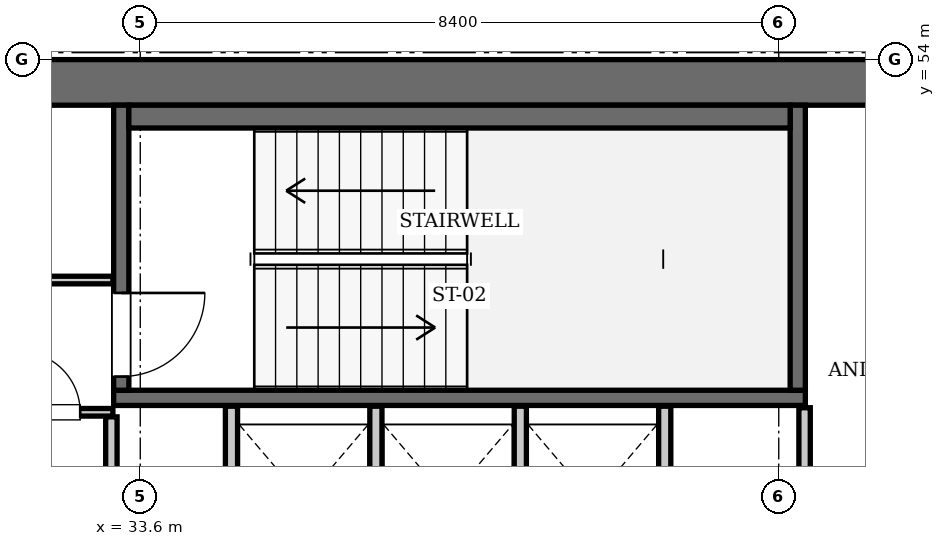
"""IFC4 building model, lengths in metres.
Left out: names, types, materials, properties, quantities, classifications, styles, units other than length and angle.
Written with IfcOpenShell. Run it as: python <this file> out.ifc"""

import sys

from ifc_helpers import new_model, si_unit, direction, frame, frame_2d, origin, place, context, subcontext, project, spatial, rectangle, extrude, element, fill, save


model = new_model("IFC4")
c1 = context("Model", 3, precision=1e-05, world=origin(), true_north=direction((0.0, 1.0)))
c2 = subcontext(c1, "Body", "Model", "MODEL_VIEW")
j1 = project(units=[si_unit("LENGTHUNIT", "METRE"), si_unit("PLANEANGLEUNIT", "RADIAN")], contexts=[c1])
p1 = place(None, origin())
s1 = spatial("IfcSite", under=j1, at=p1, CompositionType="ELEMENT")
p2 = place(p1, origin())
s2 = spatial("IfcBuilding", under=s1, at=p2, CompositionType="ELEMENT")
p3 = place(p2, frame((0.0, 0.0, 258.65)))
s3 = spatial("IfcBuildingStorey", under=s2, at=p3, CompositionType="ELEMENT", Elevation=258.65)
p4 = place(p3, frame((25.2, 53.7, 0.0), z_axis=(0.0, 0.0, 1.0), x_axis=(1.0, 0.0, 0.0)))
e1 = element("IfcWall", 1, at=p4, inside=s3, PredefinedType="SHEAR", context=c2, shape_type="SweptSolid", body=[
    extrude(rectangle(XDim=25.2, YDim=0.6, at=frame_2d((12.6, 0.0))), origin(), (0.0, 0.0, 1.0), 3.85),
])
p5 = place(p3, frame((33.25, 49.55, 0.0), z_axis=(0.0, 0.0, 1.0), x_axis=(1.0, 0.0, 0.0)))
e2 = element("IfcWall", 2, at=p5, inside=s3, PredefinedType="SOLIDWALL", context=c2, shape_type="SweptSolid", body=[
    extrude(rectangle(XDim=9.1, YDim=0.2, at=frame_2d((4.55, 0.0))), origin(), (0.0, 0.0, 1.0), 3.61),
])
p6 = place(p3, frame((42.25, 49.65, 0.0), z_axis=(0.0, 0.0, 1.0), x_axis=(0.0, 1.0, 0.0)))
e3 = element("IfcWall", 3, at=p6, inside=s3, PredefinedType="SOLIDWALL", context=c2, shape_type="SweptSolid", body=[
    extrude(rectangle(XDim=3.75, YDim=0.2, at=frame_2d((1.875, 0.0))), origin(), (0.0, 0.0, 1.0), 3.61),
])
p7 = place(p3, frame((33.35, 49.65, 0.0), z_axis=(0.0, 0.0, 1.0), x_axis=(0.0, 1.0, 0.0)))
e4 = element("IfcWall", 4, at=p7, inside=s3, PredefinedType="SOLIDWALL", context=c2, shape_type="SweptSolid", body=[
    extrude(rectangle(XDim=3.75, YDim=0.2, at=frame_2d((1.875, 0.0))), origin(), (0.0, 0.0, 1.0), 3.61),
])
p8 = place(p7, frame((0.18, 0.0, 0.0)))
e5 = element("IfcOpeningElement", 5, at=p8, cuts=e4, PredefinedType="OPENING", context=c2, shape_type="SweptSolid", body=[
    extrude(rectangle(XDim=1.1, YDim=2.15, at=frame_2d((0.55, 1.075))), frame((0.0, 0.11, 0.0), z_axis=(0.0, -1.0, 0.0), x_axis=(1.0, 0.0, 0.0)), (0.0, 0.0, 1.0), 0.22),
])
p9 = place(p3, frame((33.45, 53.25, 0.0), z_axis=(0.0, 0.0, 1.0), x_axis=(1.0, 0.0, 0.0)))
e6 = element("IfcWall", 6, at=p9, inside=s3, PredefinedType="SOLIDWALL", context=c2, shape_type="SweptSolid", body=[
    extrude(rectangle(XDim=8.7, YDim=0.3, at=frame_2d((4.35, 0.0))), origin(), (0.0, 0.0, 1.0), 3.61),
])
for number, where, z_axis, x_axis in (
    (7, (34.8, 47.25, 0.0), (0.0, 0.0, 1.0), (0.0, 1.0, 0.0)),
    (8, (36.7, 47.25, 0.0), (0.0, 0.0, 1.0), (0.0, 1.0, 0.0)),
    (9, (38.6, 47.25, 0.0), (0.0, 0.0, 1.0), (0.0, 1.0, 0.0)),
    (10, (40.5, 47.25, 0.0), (0.0, 0.0, 1.0), (0.0, 1.0, 0.0)),
):
    element("IfcWall", number, at=place(p3, frame(where, z_axis=z_axis, x_axis=x_axis)), inside=s3, PredefinedType="SOLIDWALL", context=c2, shape_type="SweptSolid", body=[
        extrude(rectangle(XDim=2.19, YDim=0.16, at=frame_2d((1.095, 0.0))), origin(), (0.0, 0.0, 1.0), 3.61),
    ])
p10 = place(p3, frame((33.22, 45.14, 0.0), z_axis=(0.0, 0.0, 1.0), x_axis=(0.0, 1.0, 0.0)))
e11 = element("IfcWall", 11, at=p10, inside=s3, PredefinedType="PARTITIONING", context=c2, shape_type="SweptSolid", body=[
    extrude(rectangle(XDim=4.16, YDim=0.15, at=frame_2d((2.08, 0.0))), origin(), (0.0, 0.0, 1.0), 3.61),
])
p11 = place(p3, frame((30.06, 49.36, 0.0), z_axis=(0.0, 0.0, 1.0), x_axis=(1.0, 0.0, 0.0)))
e12 = element("IfcWall", 12, at=p11, inside=s3, PredefinedType="PARTITIONING", context=c2, shape_type="SweptSolid", body=[
    extrude(rectangle(XDim=3.18, YDim=0.1, at=frame_2d((1.59, 0.0))), origin(), (0.0, 0.0, 1.0), 3.61),
])
p12 = place(p11, frame((1.95, 0.0, 0.0)))
e13 = element("IfcOpeningElement", 13, at=p12, cuts=e12, PredefinedType="OPENING", context=c2, shape_type="SweptSolid", body=[
    extrude(rectangle(XDim=0.8, YDim=2.05, at=frame_2d((0.4, 1.025))), frame((0.0, 0.06, 0.0), z_axis=(0.0, -1.0, 0.0), x_axis=(1.0, 0.0, 0.0)), (0.0, 0.0, 1.0), 0.12),
])
p13 = place(p3, frame((31.82, 51.1, 0.0), z_axis=(0.0, 0.0, 1.0), x_axis=(1.0, 0.0, 0.0)))
e14 = element("IfcWall", 14, at=p13, inside=s3, PredefinedType="PARTITIONING", context=c2, shape_type="SweptSolid", body=[
    extrude(rectangle(XDim=1.42, YDim=0.1, at=frame_2d((0.71, 0.0))), origin(), (0.0, 0.0, 1.0), 3.61),
])
p14 = place(p3, frame((42.34, 47.36, 0.0), z_axis=(0.0, 0.0, 1.0), x_axis=(0.0, 1.0, 0.0)))
e15 = element("IfcWall", 15, at=p14, inside=s3, PredefinedType="PARTITIONING", context=c2, shape_type="SweptSolid", body=[
    extrude(rectangle(XDim=2.06, YDim=0.15, at=frame_2d((1.03, 0.0))), origin(), (0.0, 0.0, 1.0), 3.61),
])
p15 = place(p14, frame((0.24, 0.0, 0.0)))
e16 = element("IfcOpeningElement", 16, at=p15, cuts=e15, PredefinedType="OPENING", context=c2, shape_type="SweptSolid", body=[
    extrude(rectangle(XDim=0.8, YDim=2.05, at=frame_2d((0.4, 1.025))), frame((0.0, 0.085, 0.0), z_axis=(0.0, -1.0, 0.0), x_axis=(1.0, 0.0, 0.0)), (0.0, 0.0, 1.0), 0.17),
])
p16 = place(p8, frame((1.1, 0.0, 0.0), z_axis=(0.0, 0.0, 1.0), x_axis=(-1.0, 0.0, 0.0)))
e17 = element("IfcDoor", 17, at=p16, inside=s3, OperationType="SINGLE_SWING_LEFT", PredefinedType="DOOR", context=c2, shape_type="SweptSolid", body=[
    extrude(rectangle(XDim=1.1, YDim=2.15, at=frame_2d((0.55, 1.075))), frame((0.0, 0.025, 0.0), z_axis=(0.0, -1.0, 0.0), x_axis=(1.0, 0.0, 0.0)), (0.0, 0.0, 1.0), 0.05),
])
fill(e5, e17)
p17 = place(p12, origin())
e18 = element("IfcDoor", 18, at=p17, inside=s3, OperationType="SINGLE_SWING_LEFT", PredefinedType="DOOR", context=c2, shape_type="SweptSolid", body=[
    extrude(rectangle(XDim=0.8, YDim=2.05, at=frame_2d((0.4, 1.025))), frame((0.0, 0.025, 0.0), z_axis=(0.0, -1.0, 0.0), x_axis=(1.0, 0.0, 0.0)), (0.0, 0.0, 1.0), 0.05),
])
fill(e13, e18)
save(model, sys.argv[1])
